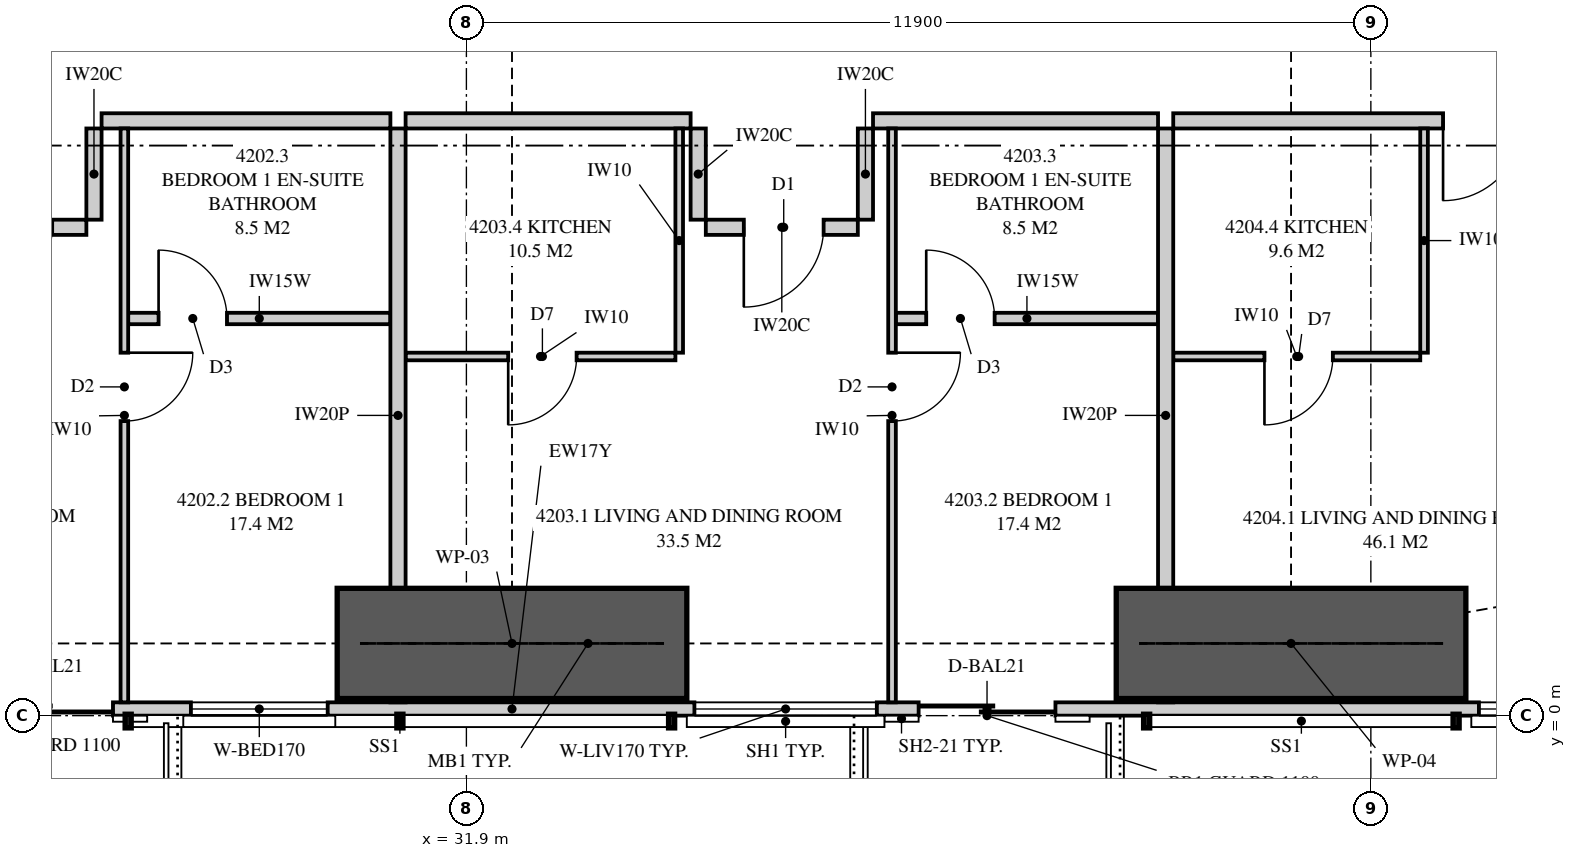
"""IFC4 building model, lengths in metres.
Left out: names, types, materials, properties, quantities, classifications, styles, units other than length and angle.
Written with IfcOpenShell. Run it as: python <this file> out.ifc"""

import sys

from ifc_helpers import new_model, si_unit, direction, frame, frame_2d, origin, place, context, subcontext, project, spatial, polyline, rectangle, outline, extrude, element, fill, save


model = new_model("IFC4")
c1 = context("Model", 3, precision=1e-05, world=origin(), true_north=direction((0.0, 1.0)))
c2 = subcontext(c1, "Body", "Model", "MODEL_VIEW")
j1 = project(units=[si_unit("LENGTHUNIT", "METRE"), si_unit("PLANEANGLEUNIT", "RADIAN")], contexts=[c1])
p1 = place(None, origin())
s1 = spatial("IfcSite", under=j1, at=p1, CompositionType="ELEMENT")
p2 = place(p1, origin())
s2 = spatial("IfcBuilding", under=s1, at=p2, CompositionType="ELEMENT")
p3 = place(p2, frame((0.0, 0.0, 157.7)))
s3 = spatial("IfcBuildingStorey", under=s2, at=p3, CompositionType="ELEMENT", Elevation=157.7)
p4 = place(p3, frame((15.051, 0.087, 0.0), z_axis=(0.0, 0.0, 1.0), x_axis=(1.0, 0.0, 0.0)))
e1 = element("IfcWall", 1, at=p4, inside=s3, PredefinedType="SOLIDWALL", context=c2, shape_type="SweptSolid", body=[
    extrude(outline(polyline([(0.0, 0.0), (34.897, 0.0), (34.897, 3.11), (27.91, 3.11), (27.91, 2.15), (27.836, 2.15), (27.836, 3.11), (27.699, 3.11), (27.699, 2.15), (7.199, 2.15), (7.199, 3.11), (7.062, 3.11), (7.062, 2.15), (6.987, 2.15), (6.987, 3.11), (0.0, 3.11), (0.0, 0.0)])), frame((0.0, 0.087, 0.0), z_axis=(0.0, -1.0, 0.0), x_axis=(1.0, 0.0, 0.0)), (0.0, 0.0, 1.0), 0.175),
])
p5 = place(p4, frame((1.625, 0.0, 0.4)))
e2 = element("IfcOpeningElement", 2, at=p5, cuts=e1, PredefinedType="OPENING", context=c2, shape_type="SweptSolid", body=[
    extrude(rectangle(XDim=2.4, YDim=1.7, at=frame_2d((1.2, 0.85))), frame((0.0, 0.097, 0.0), z_axis=(0.0, -1.0, 0.0), x_axis=(1.0, 0.0, 0.0)), (0.0, 0.0, 1.0), 0.195),
])
p6 = place(p4, frame((10.399, 0.0, 0.0)))
e3 = element("IfcOpeningElement", 3, at=p6, cuts=e1, PredefinedType="OPENING", context=c2, shape_type="SweptSolid", body=[
    extrude(rectangle(XDim=1.8, YDim=2.1, at=frame_2d((0.9, 1.05))), frame((0.0, 0.097, 0.0), z_axis=(0.0, -1.0, 0.0), x_axis=(1.0, 0.0, 0.0)), (0.0, 0.0, 1.0), 0.195),
])
p7 = place(p4, frame((13.224, 0.0, 0.4)))
e4 = element("IfcOpeningElement", 4, at=p7, cuts=e1, PredefinedType="OPENING", context=c2, shape_type="SweptSolid", body=[
    extrude(rectangle(XDim=1.8, YDim=1.7, at=frame_2d((0.9, 0.85))), frame((0.0, 0.097, 0.0), z_axis=(0.0, -1.0, 0.0), x_axis=(1.0, 0.0, 0.0)), (0.0, 0.0, 1.0), 0.195),
])
p8 = place(p4, frame((19.849, 0.0, 0.4)))
e5 = element("IfcOpeningElement", 5, at=p8, cuts=e1, PredefinedType="OPENING", context=c2, shape_type="SweptSolid", body=[
    extrude(rectangle(XDim=2.4, YDim=1.7, at=frame_2d((1.2, 0.85))), frame((0.0, 0.097, 0.0), z_axis=(0.0, -1.0, 0.0), x_axis=(1.0, 0.0, 0.0)), (0.0, 0.0, 1.0), 0.195),
])
p9 = place(p4, frame((22.799, 0.0, 0.0)))
e6 = element("IfcOpeningElement", 6, at=p9, cuts=e1, PredefinedType="OPENING", context=c2, shape_type="SweptSolid", body=[
    extrude(rectangle(XDim=1.8, YDim=2.1, at=frame_2d((0.9, 1.05))), frame((0.0, 0.097, 0.0), z_axis=(0.0, -1.0, 0.0), x_axis=(1.0, 0.0, 0.0)), (0.0, 0.0, 1.0), 0.195),
])
p10 = place(p4, frame((30.17, 0.0, 0.4)))
e7 = element("IfcOpeningElement", 7, at=p10, cuts=e1, PredefinedType="OPENING", context=c2, shape_type="SweptSolid", body=[
    extrude(rectangle(XDim=2.4, YDim=1.7, at=frame_2d((1.2, 0.85))), frame((0.0, 0.097, 0.0), z_axis=(0.0, -1.0, 0.0), x_axis=(1.0, 0.0, 0.0)), (0.0, 0.0, 1.0), 0.195),
])
p11 = place(p3, frame((31.0, 0.175, 0.0), z_axis=(0.0, 0.0, 1.0), x_axis=(0.0, 1.0, 0.0)))
e8 = element("IfcWall", 8, at=p11, inside=s3, PredefinedType="PARTITIONING", context=c2, shape_type="SweptSolid", body=[
    extrude(outline(polyline([(0.529, 2.15), (0.0, 2.15), (0.0, 0.0), (0.529, 0.0), (0.529, 0.29), (1.021, 0.29), (1.021, 0.0), (7.55, 0.0), (7.55, 3.11), (1.685, 3.11), (1.685, 2.15), (1.021, 2.15), (1.021, 1.86), (0.529, 1.86), (0.529, 2.15)])), frame((0.0, 0.1, 0.0), z_axis=(0.0, -1.0, 0.0), x_axis=(1.0, 0.0, 0.0)), (0.0, 0.0, 1.0), 0.2),
])
p12 = place(p3, frame((27.4, 0.175, 0.0), z_axis=(0.0, 0.0, 1.0), x_axis=(0.0, 1.0, 0.0)))
e9 = element("IfcWall", 9, at=p12, inside=s3, PredefinedType="PARTITIONING", context=c2, shape_type="SweptSolid", body=[
    extrude(outline(polyline([(0.0, 0.0), (7.55, 0.0), (7.55, 3.11), (1.635, 3.11), (1.635, 2.15), (0.0, 2.15), (0.0, 3.11), (0.0, 0.0)])), frame((0.0, 0.05, 0.0), z_axis=(0.0, -1.0, 0.0), x_axis=(1.0, 0.0, 0.0)), (0.0, 0.0, 1.0), 0.1),
])
p13 = place(p12, frame((3.7, 0.0, 0.0)))
e10 = element("IfcOpeningElement", 10, at=p13, cuts=e9, PredefinedType="OPENING", context=c2, shape_type="SweptSolid", body=[
    extrude(rectangle(XDim=0.9, YDim=2.1, at=frame_2d((0.45, 1.05))), frame((0.0, 0.06, 0.0), z_axis=(0.0, -1.0, 0.0), x_axis=(1.0, 0.0, 0.0)), (0.0, 0.0, 1.0), 0.12),
])
p14 = place(p3, frame((27.45, 5.225, 0.0), z_axis=(0.0, 0.0, 1.0), x_axis=(1.0, 0.0, 0.0)))
e11 = element("IfcWall", 11, at=p14, inside=s3, PredefinedType="PLUMBINGWALL", context=c2, shape_type="SweptSolid", body=[
    extrude(rectangle(XDim=3.45, YDim=0.15, at=frame_2d((1.725, 0.0))), origin(), (0.0, 0.0, 1.0), 3.11),
])
p15 = place(p14, frame((0.4, 0.0, 0.0)))
e12 = element("IfcOpeningElement", 12, at=p15, cuts=e11, PredefinedType="OPENING", context=c2, shape_type="SweptSolid", body=[
    extrude(rectangle(XDim=0.9, YDim=2.1, at=frame_2d((0.45, 1.05))), frame((0.0, 0.085, 0.0), z_axis=(0.0, -1.0, 0.0), x_axis=(1.0, 0.0, 0.0)), (0.0, 0.0, 1.0), 0.17),
])
p16 = place(p3, frame((41.1, 0.175, 0.0), z_axis=(0.0, 0.0, 1.0), x_axis=(0.0, 1.0, 0.0)))
e13 = element("IfcWall", 13, at=p16, inside=s3, PredefinedType="PARTITIONING", context=c2, shape_type="SweptSolid", body=[
    extrude(outline(polyline([(0.529, 2.15), (0.0, 2.15), (0.0, 0.0), (0.529, 0.0), (0.529, 0.165), (1.021, 0.165), (1.021, 0.0), (7.55, 0.0), (7.55, 3.11), (1.685, 3.11), (1.685, 2.15), (1.021, 2.15), (1.021, 1.985), (0.529, 1.985), (0.529, 2.15)])), frame((0.0, 0.1, 0.0), z_axis=(0.0, -1.0, 0.0), x_axis=(1.0, 0.0, 0.0)), (0.0, 0.0, 1.0), 0.2),
])
p17 = place(p3, frame((31.1, 7.825, 0.0), z_axis=(0.0, 0.0, 1.0), x_axis=(1.0, 0.0, 0.0)))
e14 = element("IfcWall", 14, at=p17, inside=s3, PredefinedType="PARTITIONING", context=c2, shape_type="SweptSolid", body=[
    extrude(outline(polyline([(0.0, 0.0), (3.75, 0.0), (3.75, 3.11), (1.746, 3.11), (1.746, 2.531), (1.054, 2.531), (1.054, 3.11), (0.0, 3.11), (0.0, 0.0)])), frame((0.0, 0.1, 0.0), z_axis=(0.0, -1.0, 0.0), x_axis=(1.0, 0.0, 0.0)), (0.0, 0.0, 1.0), 0.2),
])
p18 = place(p3, frame((37.5, 0.175, 0.0), z_axis=(0.0, 0.0, 1.0), x_axis=(0.0, 1.0, 0.0)))
e15 = element("IfcWall", 15, at=p18, inside=s3, PredefinedType="PARTITIONING", context=c2, shape_type="SweptSolid", body=[
    extrude(outline(polyline([(0.0, 0.0), (7.55, 0.0), (7.55, 3.11), (1.635, 3.11), (1.635, 2.15), (0.0, 2.15), (0.0, 3.11), (0.0, 0.0)])), frame((0.0, 0.05, 0.0), z_axis=(0.0, -1.0, 0.0), x_axis=(1.0, 0.0, 0.0)), (0.0, 0.0, 1.0), 0.1),
])
p19 = place(p18, frame((3.7, 0.0, 0.0)))
e16 = element("IfcOpeningElement", 16, at=p19, cuts=e15, PredefinedType="OPENING", context=c2, shape_type="SweptSolid", body=[
    extrude(rectangle(XDim=0.9, YDim=2.1, at=frame_2d((0.45, 1.05))), frame((0.0, 0.06, 0.0), z_axis=(0.0, -1.0, 0.0), x_axis=(1.0, 0.0, 0.0)), (0.0, 0.0, 1.0), 0.12),
])
p20 = place(p3, frame((37.55, 5.225, 0.0), z_axis=(0.0, 0.0, 1.0), x_axis=(1.0, 0.0, 0.0)))
e17 = element("IfcWall", 17, at=p20, inside=s3, PredefinedType="PLUMBINGWALL", context=c2, shape_type="SweptSolid", body=[
    extrude(rectangle(XDim=3.45, YDim=0.15, at=frame_2d((1.725, 0.0))), origin(), (0.0, 0.0, 1.0), 3.11),
])
p21 = place(p20, frame((0.4, 0.0, 0.0)))
e18 = element("IfcOpeningElement", 18, at=p21, cuts=e17, PredefinedType="OPENING", context=c2, shape_type="SweptSolid", body=[
    extrude(rectangle(XDim=0.9, YDim=2.1, at=frame_2d((0.45, 1.05))), frame((0.0, 0.085, 0.0), z_axis=(0.0, -1.0, 0.0), x_axis=(1.0, 0.0, 0.0)), (0.0, 0.0, 1.0), 0.17),
])
p22 = place(p3, frame((31.1, 4.725, 0.0), z_axis=(0.0, 0.0, 1.0), x_axis=(1.0, 0.0, 0.0)))
e19 = element("IfcWall", 19, at=p22, inside=s3, PredefinedType="PARTITIONING", context=c2, shape_type="SweptSolid", body=[
    extrude(outline(polyline([(0.0, 0.0), (3.55, 0.0), (3.55, 3.11), (1.696, 3.11), (1.696, 2.531), (1.104, 2.531), (1.104, 3.11), (0.0, 3.11), (0.0, 0.0)])), frame((0.0, 0.05, 0.0), z_axis=(0.0, -1.0, 0.0), x_axis=(1.0, 0.0, 0.0)), (0.0, 0.0, 1.0), 0.1),
])
p23 = place(p22, frame((1.35, 0.0, 0.0)))
e20 = element("IfcOpeningElement", 20, at=p23, cuts=e19, PredefinedType="OPENING", context=c2, shape_type="SweptSolid", body=[
    extrude(rectangle(XDim=0.9, YDim=2.1, at=frame_2d((0.45, 1.05))), frame((0.0, 0.06, 0.0), z_axis=(0.0, -1.0, 0.0), x_axis=(1.0, 0.0, 0.0)), (0.0, 0.0, 1.0), 0.12),
])
p24 = place(p3, frame((34.7, 4.775, 0.0), z_axis=(0.0, 0.0, 1.0), x_axis=(0.0, 1.0, 0.0)))
e21 = element("IfcWall", 21, at=p24, inside=s3, PredefinedType="PARTITIONING", context=c2, shape_type="SweptSolid", body=[
    extrude(rectangle(XDim=2.95, YDim=0.1, at=frame_2d((1.475, 0.0))), origin(), (0.0, 0.0, 1.0), 3.11),
])
p25 = place(p3, frame((41.2, 7.825, 0.0), z_axis=(0.0, 0.0, 1.0), x_axis=(1.0, 0.0, 0.0)))
e22 = element("IfcWall", 22, at=p25, inside=s3, PredefinedType="PARTITIONING", context=c2, shape_type="SweptSolid", body=[
    extrude(outline(polyline([(0.0, 0.0), (4.75, 0.0), (4.75, 3.11), (1.896, 3.11), (1.896, 2.531), (1.204, 2.531), (1.204, 3.11), (0.0, 3.11), (0.0, 0.0)])), frame((0.0, 0.1, 0.0), z_axis=(0.0, -1.0, 0.0), x_axis=(1.0, 0.0, 0.0)), (0.0, 0.0, 1.0), 0.2),
])
p26 = place(p25, frame((3.55, 0.0, 0.0)))
e23 = element("IfcOpeningElement", 23, at=p26, cuts=e22, PredefinedType="OPENING", context=c2, shape_type="SweptSolid", body=[
    extrude(rectangle(XDim=1.05, YDim=2.2, at=frame_2d((0.525, 1.1))), frame((0.0, 0.11, 0.0), z_axis=(0.0, -1.0, 0.0), x_axis=(1.0, 0.0, 0.0)), (0.0, 0.0, 1.0), 0.22),
])
p27 = place(p3, frame((41.2, 4.725, 0.0), z_axis=(0.0, 0.0, 1.0), x_axis=(1.0, 0.0, 0.0)))
e24 = element("IfcWall", 24, at=p27, inside=s3, PredefinedType="PARTITIONING", context=c2, shape_type="SweptSolid", body=[
    extrude(outline(polyline([(0.0, 0.0), (3.25, 0.0), (3.25, 3.11), (1.846, 3.11), (1.846, 2.531), (1.254, 2.531), (1.254, 3.11), (0.0, 3.11), (0.0, 0.0)])), frame((0.0, 0.05, 0.0), z_axis=(0.0, -1.0, 0.0), x_axis=(1.0, 0.0, 0.0)), (0.0, 0.0, 1.0), 0.1),
])
p28 = place(p27, frame((1.2, 0.0, 0.0)))
e25 = element("IfcOpeningElement", 25, at=p28, cuts=e24, PredefinedType="OPENING", context=c2, shape_type="SweptSolid", body=[
    extrude(rectangle(XDim=0.9, YDim=2.1, at=frame_2d((0.45, 1.05))), frame((0.0, 0.06, 0.0), z_axis=(0.0, -1.0, 0.0), x_axis=(1.0, 0.0, 0.0)), (0.0, 0.0, 1.0), 0.12),
])
p29 = place(p3, frame((44.5, 4.775, 0.0), z_axis=(0.0, 0.0, 1.0), x_axis=(0.0, 1.0, 0.0)))
e26 = element("IfcWall", 26, at=p29, inside=s3, PredefinedType="PARTITIONING", context=c2, shape_type="SweptSolid", body=[
    extrude(rectangle(XDim=2.95, YDim=0.1, at=frame_2d((1.475, 0.0))), origin(), (0.0, 0.0, 1.0), 3.11),
])
p30 = place(p3, frame((27.1, 7.825, 0.0), z_axis=(0.0, 0.0, 1.0), x_axis=(1.0, 0.0, 0.0)))
e27 = element("IfcWall", 27, at=p30, inside=s3, PredefinedType="PARTITIONING", context=c2, shape_type="SweptSolid", body=[
    extrude(rectangle(XDim=3.8, YDim=0.2, at=frame_2d((1.9, 0.0))), origin(), (0.0, 0.0, 1.0), 3.11),
])
p31 = place(p3, frame((24.9, 6.425, 0.0), z_axis=(0.0, 0.0, 1.0), x_axis=(1.0, 0.0, 0.0)))
e28 = element("IfcWall", 28, at=p31, inside=s3, PredefinedType="PARTITIONING", context=c2, shape_type="SweptSolid", body=[
    extrude(rectangle(XDim=2.0, YDim=0.2, at=frame_2d((1.0, 0.0))), origin(), (0.0, 0.0, 1.0), 3.11),
])
p32 = place(p31, frame((0.5, 0.0, 0.0)))
e29 = element("IfcOpeningElement", 29, at=p32, cuts=e28, PredefinedType="OPENING", context=c2, shape_type="SweptSolid", body=[
    extrude(rectangle(XDim=1.05, YDim=2.2, at=frame_2d((0.525, 1.1))), frame((0.0, 0.11, 0.0), z_axis=(0.0, -1.0, 0.0), x_axis=(1.0, 0.0, 0.0)), (0.0, 0.0, 1.0), 0.22),
])
p33 = place(p3, frame((27.0, 7.725, 0.0), z_axis=(0.0, 0.0, 1.0), x_axis=(0.0, -1.0, 0.0)))
e30 = element("IfcWall", 30, at=p33, inside=s3, PredefinedType="PARTITIONING", context=c2, shape_type="SweptSolid", body=[
    extrude(rectangle(XDim=1.2, YDim=0.2, at=frame_2d((0.6, 0.0))), origin(), (0.0, 0.0, 1.0), 3.11),
])
p34 = place(p3, frame((37.25, 7.825, 0.0), z_axis=(0.0, 0.0, 1.0), x_axis=(1.0, 0.0, 0.0)))
e31 = element("IfcWall", 31, at=p34, inside=s3, PredefinedType="PARTITIONING", context=c2, shape_type="SweptSolid", body=[
    extrude(rectangle(XDim=3.75, YDim=0.2, at=frame_2d((1.875, 0.0))), origin(), (0.0, 0.0, 1.0), 3.11),
])
p35 = place(p3, frame((35.05, 6.425, 0.0), z_axis=(0.0, 0.0, 1.0), x_axis=(1.0, 0.0, 0.0)))
e32 = element("IfcWall", 32, at=p35, inside=s3, PredefinedType="PARTITIONING", context=c2, shape_type="SweptSolid", body=[
    extrude(rectangle(XDim=2.0, YDim=0.2, at=frame_2d((1.0, 0.0))), origin(), (0.0, 0.0, 1.0), 3.11),
])
p36 = place(p35, frame((0.5, 0.0, 0.0)))
e33 = element("IfcOpeningElement", 33, at=p36, cuts=e32, PredefinedType="OPENING", context=c2, shape_type="SweptSolid", body=[
    extrude(rectangle(XDim=1.05, YDim=2.2, at=frame_2d((0.525, 1.1))), frame((0.0, 0.11, 0.0), z_axis=(0.0, -1.0, 0.0), x_axis=(1.0, 0.0, 0.0)), (0.0, 0.0, 1.0), 0.22),
])
for number, where, z_axis, x_axis in (
    (34, (34.95, 7.725, 0.0), (0.0, 0.0, 1.0), (0.0, -1.0, 0.0)),
    (35, (37.15, 7.725, 0.0), (0.0, 0.0, 1.0), (0.0, -1.0, 0.0)),
):
    element("IfcWall", number, at=place(p3, frame(where, z_axis=z_axis, x_axis=x_axis)), inside=s3, PredefinedType="PARTITIONING", context=c2, shape_type="SweptSolid", body=[
        extrude(rectangle(XDim=1.2, YDim=0.2, at=frame_2d((0.6, 0.0))), origin(), (0.0, 0.0, 1.0), 3.11),
    ])
for number, where, z_axis, x_axis in (
    (36, (30.2, 0.95, 0.0), (0.0, 0.0, 1.0), (1.0, 0.0, 0.0)),
    (37, (40.45, 0.95, 0.0), (0.0, 0.0, 1.0), (1.0, 0.0, 0.0)),
):
    element("IfcWall", number, at=place(p3, frame(where, z_axis=z_axis, x_axis=x_axis)), inside=s3, PredefinedType="SHEAR", context=c2, shape_type="SweptSolid", body=[
        extrude(rectangle(XDim=4.6, YDim=1.45, at=frame_2d((2.3, 0.0))), origin(), (0.0, 0.0, 1.0), 3.35),
    ])
p37 = place(p6, origin())
e38 = element("IfcDoor", 38, at=p37, inside=s3, OperationType="SLIDING_TO_LEFT", PredefinedType="DOOR", context=c2, shape_type="SweptSolid", body=[
    extrude(rectangle(XDim=1.8, YDim=2.1, at=frame_2d((0.9, 1.05))), frame((0.0, 0.025, 0.0), z_axis=(0.0, -1.0, 0.0), x_axis=(1.0, 0.0, 0.0)), (0.0, 0.0, 1.0), 0.05),
])
fill(e3, e38)
p38 = place(p7, origin())
e39 = element("IfcWindow", 39, at=p38, inside=s3, PartitioningType="SINGLE_PANEL", PredefinedType="WINDOW", context=c2, shape_type="SweptSolid", body=[
    extrude(rectangle(XDim=1.8, YDim=1.7, at=frame_2d((0.9, 0.85))), frame((0.0, 0.03, 0.0), z_axis=(0.0, -1.0, 0.0), x_axis=(1.0, 0.0, 0.0)), (0.0, 0.0, 1.0), 0.06),
])
fill(e4, e39)
p39 = place(p8, origin())
e40 = element("IfcWindow", 40, at=p39, inside=s3, PartitioningType="SINGLE_PANEL", PredefinedType="WINDOW", context=c2, shape_type="SweptSolid", body=[
    extrude(rectangle(XDim=2.4, YDim=1.7, at=frame_2d((1.2, 0.85))), frame((0.0, 0.03, 0.0), z_axis=(0.0, -1.0, 0.0), x_axis=(1.0, 0.0, 0.0)), (0.0, 0.0, 1.0), 0.06),
])
fill(e5, e40)
p40 = place(p9, origin())
e41 = element("IfcDoor", 41, at=p40, inside=s3, OperationType="SLIDING_TO_LEFT", PredefinedType="DOOR", context=c2, shape_type="SweptSolid", body=[
    extrude(rectangle(XDim=1.8, YDim=2.1, at=frame_2d((0.9, 1.05))), frame((0.0, 0.025, 0.0), z_axis=(0.0, -1.0, 0.0), x_axis=(1.0, 0.0, 0.0)), (0.0, 0.0, 1.0), 0.05),
])
fill(e6, e41)
p41 = place(p10, origin())
e42 = element("IfcWindow", 42, at=p41, inside=s3, PartitioningType="SINGLE_PANEL", PredefinedType="WINDOW", context=c2, shape_type="SweptSolid", body=[
    extrude(rectangle(XDim=2.4, YDim=1.7, at=frame_2d((1.2, 0.85))), frame((0.0, 0.03, 0.0), z_axis=(0.0, -1.0, 0.0), x_axis=(1.0, 0.0, 0.0)), (0.0, 0.0, 1.0), 0.06),
])
fill(e7, e42)
p42 = place(p32, frame((1.05, 0.0, 0.0), z_axis=(0.0, 0.0, 1.0), x_axis=(-1.0, 0.0, 0.0)))
e43 = element("IfcDoor", 43, at=p42, inside=s3, OperationType="SINGLE_SWING_RIGHT", PredefinedType="DOOR", context=c2, shape_type="SweptSolid", body=[
    extrude(rectangle(XDim=1.05, YDim=2.2, at=frame_2d((0.525, 1.1))), frame((0.0, 0.025, 0.0), z_axis=(0.0, -1.0, 0.0), x_axis=(1.0, 0.0, 0.0)), (0.0, 0.0, 1.0), 0.05),
])
fill(e29, e43)
p43 = place(p13, frame((0.9, 0.0, 0.0), z_axis=(0.0, 0.0, 1.0), x_axis=(-1.0, 0.0, 0.0)))
e44 = element("IfcDoor", 44, at=p43, inside=s3, OperationType="SINGLE_SWING_LEFT", PredefinedType="DOOR", context=c2, shape_type="SweptSolid", body=[
    extrude(rectangle(XDim=0.9, YDim=2.1, at=frame_2d((0.45, 1.05))), frame((0.0, 0.025, 0.0), z_axis=(0.0, -1.0, 0.0), x_axis=(1.0, 0.0, 0.0)), (0.0, 0.0, 1.0), 0.05),
])
fill(e10, e44)
p44 = place(p15, origin())
e45 = element("IfcDoor", 45, at=p44, inside=s3, OperationType="SINGLE_SWING_LEFT", PredefinedType="DOOR", context=c2, shape_type="SweptSolid", body=[
    extrude(rectangle(XDim=0.9, YDim=2.1, at=frame_2d((0.45, 1.05))), frame((0.0, 0.025, 0.0), z_axis=(0.0, -1.0, 0.0), x_axis=(1.0, 0.0, 0.0)), (0.0, 0.0, 1.0), 0.05),
])
fill(e12, e45)
p45 = place(p36, frame((1.05, 0.0, 0.0), z_axis=(0.0, 0.0, 1.0), x_axis=(-1.0, 0.0, 0.0)))
e46 = element("IfcDoor", 46, at=p45, inside=s3, OperationType="SINGLE_SWING_RIGHT", PredefinedType="DOOR", context=c2, shape_type="SweptSolid", body=[
    extrude(rectangle(XDim=1.05, YDim=2.2, at=frame_2d((0.525, 1.1))), frame((0.0, 0.025, 0.0), z_axis=(0.0, -1.0, 0.0), x_axis=(1.0, 0.0, 0.0)), (0.0, 0.0, 1.0), 0.05),
])
fill(e33, e46)
p46 = place(p19, frame((0.9, 0.0, 0.0), z_axis=(0.0, 0.0, 1.0), x_axis=(-1.0, 0.0, 0.0)))
e47 = element("IfcDoor", 47, at=p46, inside=s3, OperationType="SINGLE_SWING_LEFT", PredefinedType="DOOR", context=c2, shape_type="SweptSolid", body=[
    extrude(rectangle(XDim=0.9, YDim=2.1, at=frame_2d((0.45, 1.05))), frame((0.0, 0.025, 0.0), z_axis=(0.0, -1.0, 0.0), x_axis=(1.0, 0.0, 0.0)), (0.0, 0.0, 1.0), 0.05),
])
fill(e16, e47)
p47 = place(p21, origin())
e48 = element("IfcDoor", 48, at=p47, inside=s3, OperationType="SINGLE_SWING_LEFT", PredefinedType="DOOR", context=c2, shape_type="SweptSolid", body=[
    extrude(rectangle(XDim=0.9, YDim=2.1, at=frame_2d((0.45, 1.05))), frame((0.0, 0.025, 0.0), z_axis=(0.0, -1.0, 0.0), x_axis=(1.0, 0.0, 0.0)), (0.0, 0.0, 1.0), 0.05),
])
fill(e18, e48)
p48 = place(p23, frame((0.9, 0.0, 0.0), z_axis=(0.0, 0.0, 1.0), x_axis=(-1.0, 0.0, 0.0)))
e49 = element("IfcDoor", 49, at=p48, inside=s3, OperationType="SINGLE_SWING_RIGHT", PredefinedType="DOOR", context=c2, shape_type="SweptSolid", body=[
    extrude(rectangle(XDim=0.9, YDim=2.1, at=frame_2d((0.45, 1.05))), frame((0.0, 0.025, 0.0), z_axis=(0.0, -1.0, 0.0), x_axis=(1.0, 0.0, 0.0)), (0.0, 0.0, 1.0), 0.05),
])
fill(e20, e49)
p49 = place(p26, frame((1.05, 0.0, 0.0), z_axis=(0.0, 0.0, 1.0), x_axis=(-1.0, 0.0, 0.0)))
e50 = element("IfcDoor", 50, at=p49, inside=s3, OperationType="SINGLE_SWING_RIGHT", PredefinedType="DOOR", context=c2, shape_type="SweptSolid", body=[
    extrude(rectangle(XDim=1.05, YDim=2.2, at=frame_2d((0.525, 1.1))), frame((0.0, 0.025, 0.0), z_axis=(0.0, -1.0, 0.0), x_axis=(1.0, 0.0, 0.0)), (0.0, 0.0, 1.0), 0.05),
])
fill(e23, e50)
p50 = place(p28, frame((0.9, 0.0, 0.0), z_axis=(0.0, 0.0, 1.0), x_axis=(-1.0, 0.0, 0.0)))
e51 = element("IfcDoor", 51, at=p50, inside=s3, OperationType="SINGLE_SWING_RIGHT", PredefinedType="DOOR", context=c2, shape_type="SweptSolid", body=[
    extrude(rectangle(XDim=0.9, YDim=2.1, at=frame_2d((0.45, 1.05))), frame((0.0, 0.025, 0.0), z_axis=(0.0, -1.0, 0.0), x_axis=(1.0, 0.0, 0.0)), (0.0, 0.0, 1.0), 0.05),
])
fill(e25, e51)
save(model, sys.argv[1])
